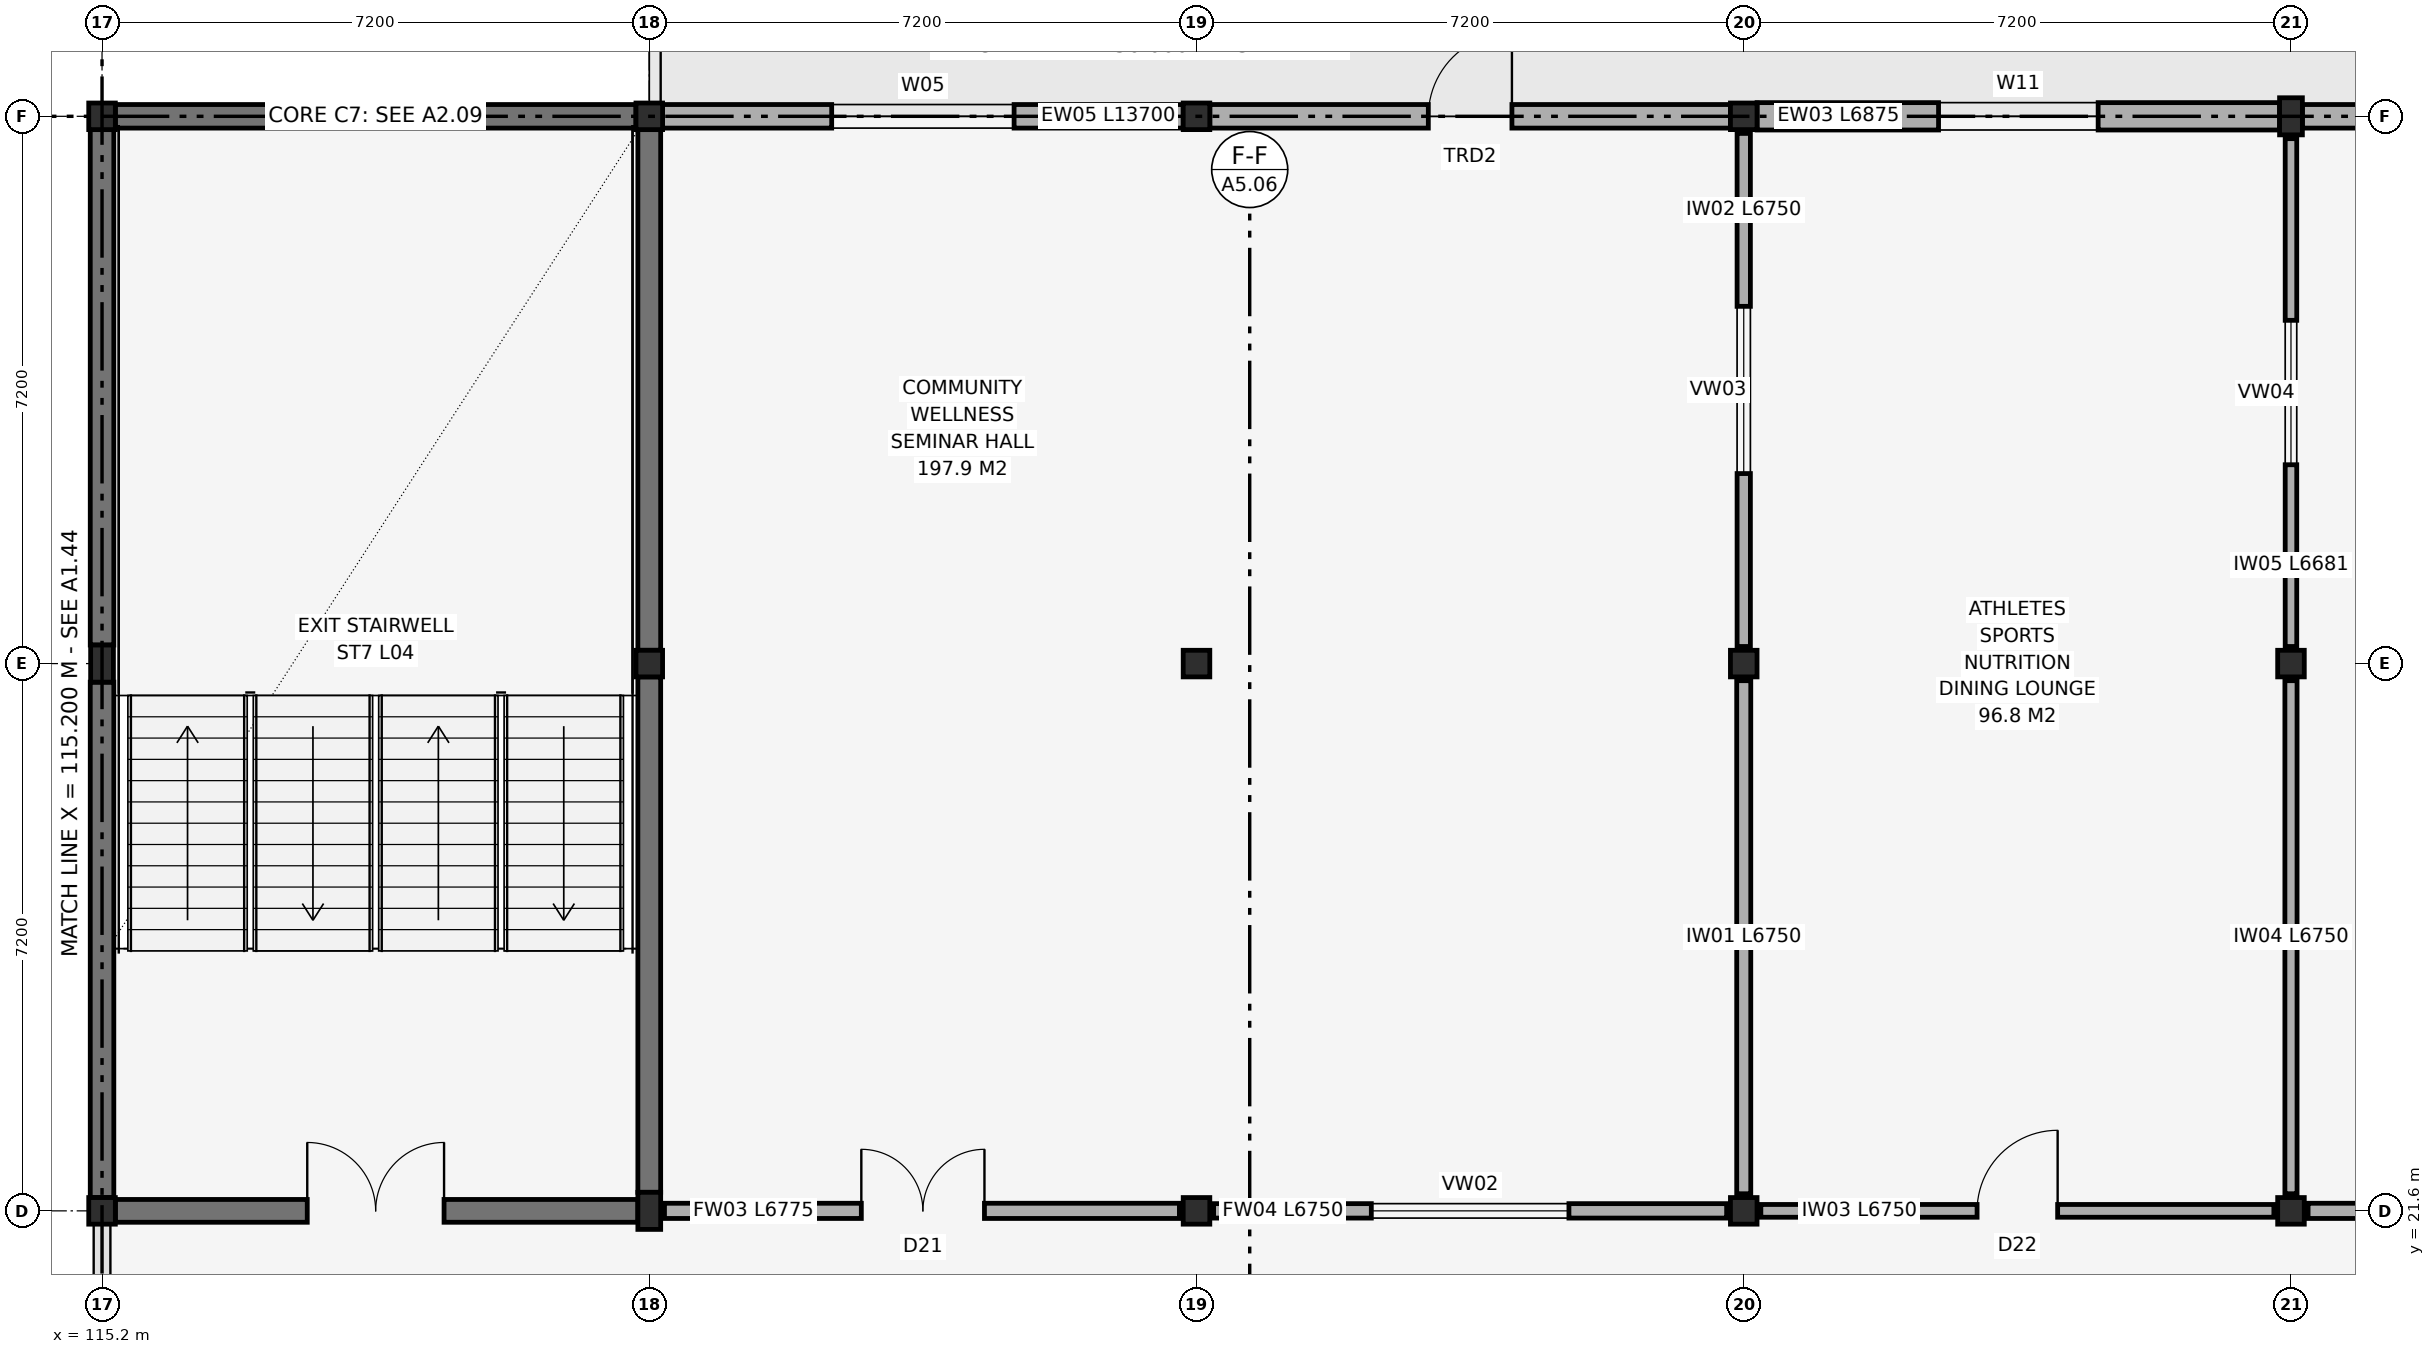
"""IFC4 building model, lengths in metres.
Left out: names, types, materials, properties, quantities, classifications, styles, units other than length and angle.
Written with IfcOpenShell. Run it as: python <this file> out.ifc"""

import sys

from ifc_helpers import new_model, si_unit, direction, frame, frame_2d, origin, origin_2d, place, context, subcontext, project, spatial, rectangle, i_section, extrude, element, fill, save


model = new_model("IFC4")
c1 = context("Model", 3, precision=1e-05, world=origin(), true_north=direction((0.0, 1.0)))
c2 = subcontext(c1, "Body", "Model", "MODEL_VIEW")
j1 = project(units=[si_unit("LENGTHUNIT", "METRE"), si_unit("PLANEANGLEUNIT", "RADIAN")], contexts=[c1])
p1 = place(None, origin())
s1 = spatial("IfcSite", under=j1, at=p1, CompositionType="ELEMENT")
p2 = place(p1, origin())
s2 = spatial("IfcBuilding", under=s1, at=p2, CompositionType="ELEMENT")
p3 = place(p2, frame((0.0, 0.0, 19.2)))
s3 = spatial("IfcBuildingStorey", under=s2, at=p3, CompositionType="ELEMENT", Elevation=19.2)
p4 = place(p3, frame((115.2, 21.6, 0.0), z_axis=(0.0, 0.0, 1.0), x_axis=(1.0, 0.0, 0.0)))
e1 = element("IfcColumn", 1, at=p4, inside=s3, PredefinedType="COLUMN", context=c2, shape_type="SweptSolid", body=[
    extrude(i_section(OverallWidth=0.35, OverallDepth=0.35, WebThickness=0.012, FlangeThickness=0.019, FilletRadius=0.02, at=origin_2d()), origin(), (0.0, 0.0, 1.0), 4.2),
])
p5 = place(p3, frame((115.2, 28.8, 0.0), z_axis=(0.0, 0.0, 1.0), x_axis=(1.0, 0.0, 0.0)))
e2 = element("IfcColumn", 2, at=p5, inside=s3, PredefinedType="COLUMN", context=c2, shape_type="SweptSolid", body=[
    extrude(i_section(OverallWidth=0.3, OverallDepth=0.488, WebThickness=0.011, FlangeThickness=0.018, FilletRadius=0.026, at=origin_2d()), origin(), (0.0, 0.0, 1.0), 4.2),
])
p6 = place(p3, frame((115.2, 36.0, 0.0), z_axis=(0.0, 0.0, 1.0), x_axis=(1.0, 0.0, 0.0)))
e3 = element("IfcColumn", 3, at=p6, inside=s3, PredefinedType="COLUMN", context=c2, shape_type="SweptSolid", body=[
    extrude(i_section(OverallWidth=0.35, OverallDepth=0.35, WebThickness=0.012, FlangeThickness=0.019, FilletRadius=0.02, at=origin_2d()), origin(), (0.0, 0.0, 1.0), 4.2),
])
p7 = place(p3, frame((122.4, 21.6, 0.0), z_axis=(0.0, 0.0, 1.0), x_axis=(1.0, 0.0, 0.0)))
e4 = element("IfcColumn", 4, at=p7, inside=s3, PredefinedType="COLUMN", context=c2, shape_type="SweptSolid", body=[
    extrude(i_section(OverallWidth=0.3, OverallDepth=0.488, WebThickness=0.011, FlangeThickness=0.018, FilletRadius=0.026, at=origin_2d()), origin(), (0.0, 0.0, 1.0), 4.2),
])
for number, where, z_axis, x_axis in (
    (5, (122.4, 28.8, 0.0), (0.0, 0.0, 1.0), (1.0, 0.0, 0.0)),
    (6, (122.4, 36.0, 0.0), (0.0, 0.0, 1.0), (1.0, 0.0, 0.0)),
    (7, (129.6, 21.6, 0.0), (0.0, 0.0, 1.0), (1.0, 0.0, 0.0)),
    (8, (129.6, 28.8, 0.0), (0.0, 0.0, 1.0), (1.0, 0.0, 0.0)),
    (9, (129.6, 36.0, 0.0), (0.0, 0.0, 1.0), (1.0, 0.0, 0.0)),
    (10, (136.8, 21.6, 0.0), (0.0, 0.0, 1.0), (1.0, 0.0, 0.0)),
    (11, (136.8, 28.8, 0.0), (0.0, 0.0, 1.0), (1.0, 0.0, 0.0)),
    (12, (136.8, 36.0, 0.0), (0.0, 0.0, 1.0), (1.0, 0.0, 0.0)),
    (13, (144.0, 21.6, 0.0), (0.0, 0.0, 1.0), (1.0, 0.0, 0.0)),
    (14, (144.0, 28.8, 0.0), (0.0, 0.0, 1.0), (1.0, 0.0, 0.0)),
):
    element("IfcColumn", number, at=place(p3, frame(where, z_axis=z_axis, x_axis=x_axis)), inside=s3, PredefinedType="COLUMN", context=c2, shape_type="SweptSolid", body=[
        extrude(i_section(OverallWidth=0.35, OverallDepth=0.35, WebThickness=0.012, FlangeThickness=0.019, FilletRadius=0.02, at=origin_2d()), origin(), (0.0, 0.0, 1.0), 4.2),
    ])
p8 = place(p3, frame((144.0, 36.0, 0.0), z_axis=(0.0, 0.0, 1.0), x_axis=(1.0, 0.0, 0.0)))
e15 = element("IfcColumn", 15, at=p8, inside=s3, PredefinedType="COLUMN", context=c2, shape_type="SweptSolid", body=[
    extrude(i_section(OverallWidth=0.3, OverallDepth=0.488, WebThickness=0.011, FlangeThickness=0.018, FilletRadius=0.026, at=origin_2d()), origin(), (0.0, 0.0, 1.0), 4.2),
])
p9 = place(p3, frame((122.575, 36.0, 0.0), z_axis=(0.0, 0.0, 1.0), x_axis=(1.0, 0.0, 0.0)))
e16 = element("IfcWall", 16, at=p9, inside=s3, PredefinedType="SOLIDWALL", context=c2, shape_type="SweptSolid", body=[
    extrude(rectangle(XDim=6.85, YDim=0.31, at=frame_2d((3.425, 0.0))), origin(), (0.0, 0.0, 1.0), 3.64),
])
p10 = place(p9, frame((2.225, 0.0, 0.95)))
e17 = element("IfcOpeningElement", 17, at=p10, cuts=e16, PredefinedType="OPENING", context=c2, shape_type="SweptSolid", body=[
    extrude(rectangle(XDim=2.4, YDim=2.0, at=frame_2d((1.2, 1.0))), frame((0.0, 0.17, 0.0), z_axis=(0.0, -1.0, 0.0), x_axis=(1.0, 0.0, 0.0)), (0.0, 0.0, 1.0), 0.34),
])
p11 = place(p3, frame((129.775, 36.0, 0.0), z_axis=(0.0, 0.0, 1.0), x_axis=(1.0, 0.0, 0.0)))
e18 = element("IfcWall", 18, at=p11, inside=s3, PredefinedType="SOLIDWALL", context=c2, shape_type="SweptSolid", body=[
    extrude(rectangle(XDim=6.85, YDim=0.31, at=frame_2d((3.425, 0.0))), origin(), (0.0, 0.0, 1.0), 3.64),
])
p12 = place(p11, frame((2.875, 0.0, 0.0)))
e19 = element("IfcOpeningElement", 19, at=p12, cuts=e18, PredefinedType="OPENING", context=c2, shape_type="SweptSolid", body=[
    extrude(rectangle(XDim=1.1, YDim=2.2, at=frame_2d((0.55, 1.1))), frame((0.0, 0.17, 0.0), z_axis=(0.0, -1.0, 0.0), x_axis=(1.0, 0.0, 0.0)), (0.0, 0.0, 1.0), 0.34),
])
p13 = place(p3, frame((136.975, 36.0, 0.0), z_axis=(0.0, 0.0, 1.0), x_axis=(1.0, 0.0, 0.0)))
e20 = element("IfcWall", 20, at=p13, inside=s3, PredefinedType="SOLIDWALL", context=c2, shape_type="SweptSolid", body=[
    extrude(rectangle(XDim=6.875, YDim=0.36, at=frame_2d((3.438, 0.0))), origin(), (0.0, 0.0, 1.0), 3.64),
])
p14 = place(p13, frame((2.388, 0.0, 0.95)))
e21 = element("IfcOpeningElement", 21, at=p14, cuts=e20, PredefinedType="OPENING", context=c2, shape_type="SweptSolid", body=[
    extrude(rectangle(XDim=2.1, YDim=1.75, at=frame_2d((1.05, 0.875))), frame((0.0, 0.195, 0.0), z_axis=(0.0, -1.0, 0.0), x_axis=(1.0, 0.0, 0.0)), (0.0, 0.0, 1.0), 0.39),
])
p15 = place(p3, frame((144.15, 36.0, 0.0), z_axis=(0.0, 0.0, 1.0), x_axis=(1.0, 0.0, 0.0)))
e22 = element("IfcWall", 22, at=p15, inside=s3, PredefinedType="SOLIDWALL", context=c2, shape_type="SweptSolid", body=[
    extrude(rectangle(XDim=6.875, YDim=0.31, at=frame_2d((3.438, 0.0))), origin(), (0.0, 0.0, 1.0), 3.64),
])
p16 = place(p15, frame((2.837, 0.0, 0.95)))
e23 = element("IfcOpeningElement", 23, at=p16, cuts=e22, PredefinedType="OPENING", context=c2, shape_type="SweptSolid", body=[
    extrude(rectangle(XDim=1.2, YDim=1.75, at=frame_2d((0.6, 0.875))), frame((0.0, 0.17, 0.0), z_axis=(0.0, -1.0, 0.0), x_axis=(1.0, 0.0, 0.0)), (0.0, 0.0, 1.0), 0.34),
])
p17 = place(p3, frame((115.375, 21.6, 0.0), z_axis=(0.0, 0.0, 1.0), x_axis=(1.0, 0.0, 0.0)))
e24 = element("IfcWall", 24, at=p17, inside=s3, PredefinedType="SHEAR", context=c2, shape_type="SweptSolid", body=[
    extrude(rectangle(XDim=6.875, YDim=0.3, at=frame_2d((3.438, 0.0))), origin(), (0.0, 0.0, 1.0), 3.98),
])
p18 = place(p17, frame((2.525, 0.0, 0.0)))
e25 = element("IfcOpeningElement", 25, at=p18, cuts=e24, PredefinedType="OPENING", context=c2, shape_type="SweptSolid", body=[
    extrude(rectangle(XDim=1.8, YDim=2.2, at=frame_2d((0.9, 1.1))), frame((0.0, 0.165, 0.0), z_axis=(0.0, -1.0, 0.0), x_axis=(1.0, 0.0, 0.0)), (0.0, 0.0, 1.0), 0.33),
])
p19 = place(p3, frame((115.375, 36.0, 0.0), z_axis=(0.0, 0.0, 1.0), x_axis=(1.0, 0.0, 0.0)))
e26 = element("IfcWall", 26, at=p19, inside=s3, PredefinedType="SHEAR", context=c2, shape_type="SweptSolid", body=[
    extrude(rectangle(XDim=6.85, YDim=0.31, at=frame_2d((3.425, 0.0))), origin(), (0.0, 0.0, 1.0), 3.98),
])
for number, where, z_axis, x_axis in (
    (27, (115.2, 21.775, 0.0), (0.0, 0.0, 1.0), (0.0, 1.0, 0.0)),
    (28, (115.2, 29.044, 0.0), (0.0, 0.0, 1.0), (0.0, 1.0, 0.0)),
):
    element("IfcWall", number, at=place(p3, frame(where, z_axis=z_axis, x_axis=x_axis)), inside=s3, PredefinedType="SHEAR", context=c2, shape_type="SweptSolid", body=[
        extrude(rectangle(XDim=6.781, YDim=0.31, at=frame_2d((3.391, 0.0))), origin(), (0.0, 0.0, 1.0), 3.98),
    ])
p20 = place(p3, frame((122.4, 21.844, 0.0), z_axis=(0.0, 0.0, 1.0), x_axis=(0.0, 1.0, 0.0)))
e29 = element("IfcWall", 29, at=p20, inside=s3, PredefinedType="SHEAR", context=c2, shape_type="SweptSolid", body=[
    extrude(rectangle(XDim=6.781, YDim=0.3, at=frame_2d((3.391, 0.0))), origin(), (0.0, 0.0, 1.0), 3.98),
])
p21 = place(p3, frame((122.4, 28.975, 0.0), z_axis=(0.0, 0.0, 1.0), x_axis=(0.0, 1.0, 0.0)))
e30 = element("IfcWall", 30, at=p21, inside=s3, PredefinedType="SHEAR", context=c2, shape_type="SweptSolid", body=[
    extrude(rectangle(XDim=6.85, YDim=0.3, at=frame_2d((3.425, 0.0))), origin(), (0.0, 0.0, 1.0), 3.98),
])
p22 = place(p3, frame((122.6, 21.6, 0.0), z_axis=(0.0, 0.0, 1.0), x_axis=(1.0, 0.0, 0.0)))
e31 = element("IfcWall", 31, at=p22, inside=s3, PredefinedType="SOLIDWALL", context=c2, shape_type="SweptSolid", body=[
    extrude(rectangle(XDim=6.775, YDim=0.2, at=frame_2d((3.387, 0.0))), origin(), (0.0, 0.0, 1.0), 3.64),
])
p23 = place(p22, frame((2.59, 0.0, 0.0)))
e32 = element("IfcOpeningElement", 32, at=p23, cuts=e31, PredefinedType="OPENING", context=c2, shape_type="SweptSolid", body=[
    extrude(rectangle(XDim=1.62, YDim=2.2, at=frame_2d((0.81, 1.1))), frame((0.0, 0.115, 0.0), z_axis=(0.0, -1.0, 0.0), x_axis=(1.0, 0.0, 0.0)), (0.0, 0.0, 1.0), 0.23),
])
p24 = place(p3, frame((129.825, 21.6, 0.0), z_axis=(0.0, 0.0, 1.0), x_axis=(1.0, 0.0, 0.0)))
e33 = element("IfcWall", 33, at=p24, inside=s3, PredefinedType="SOLIDWALL", context=c2, shape_type="SweptSolid", body=[
    extrude(rectangle(XDim=6.75, YDim=0.19, at=frame_2d((3.375, 0.0))), origin(), (0.0, 0.0, 1.0), 3.64),
])
p25 = place(p24, frame((2.075, 0.0, 0.95)))
e34 = element("IfcOpeningElement", 34, at=p25, cuts=e33, PredefinedType="OPENING", context=c2, shape_type="SweptSolid", body=[
    extrude(rectangle(XDim=2.6, YDim=1.5, at=frame_2d((1.3, 0.75))), frame((0.0, 0.11, 0.0), z_axis=(0.0, -1.0, 0.0), x_axis=(1.0, 0.0, 0.0)), (0.0, 0.0, 1.0), 0.22),
])
p26 = place(p3, frame((136.8, 21.825, 0.0), z_axis=(0.0, 0.0, 1.0), x_axis=(0.0, 1.0, 0.0)))
e35 = element("IfcWall", 35, at=p26, inside=s3, PredefinedType="PARTITIONING", context=c2, shape_type="SweptSolid", body=[
    extrude(rectangle(XDim=6.75, YDim=0.185, at=frame_2d((3.375, 0.0))), origin(), (0.0, 0.0, 1.0), 3.64),
])
p27 = place(p3, frame((136.8, 29.025, 0.0), z_axis=(0.0, 0.0, 1.0), x_axis=(0.0, 1.0, 0.0)))
e36 = element("IfcWall", 36, at=p27, inside=s3, PredefinedType="PARTITIONING", context=c2, shape_type="SweptSolid", body=[
    extrude(rectangle(XDim=6.75, YDim=0.175, at=frame_2d((3.375, 0.0))), origin(), (0.0, 0.0, 1.0), 3.64),
])
p28 = place(p27, frame((2.275, 0.0, 0.95)))
e37 = element("IfcOpeningElement", 37, at=p28, cuts=e36, PredefinedType="OPENING", context=c2, shape_type="SweptSolid", body=[
    extrude(rectangle(XDim=2.2, YDim=1.5, at=frame_2d((1.1, 0.75))), frame((0.0, 0.103, 0.0), z_axis=(0.0, -1.0, 0.0), x_axis=(1.0, 0.0, 0.0)), (0.0, 0.0, 1.0), 0.205),
])
p29 = place(p3, frame((137.025, 21.6, 0.0), z_axis=(0.0, 0.0, 1.0), x_axis=(1.0, 0.0, 0.0)))
e38 = element("IfcWall", 38, at=p29, inside=s3, PredefinedType="PARTITIONING", context=c2, shape_type="SweptSolid", body=[
    extrude(rectangle(XDim=6.75, YDim=0.168, at=frame_2d((3.375, 0.0))), origin(), (0.0, 0.0, 1.0), 3.64),
])
p30 = place(p29, frame((2.845, 0.0, 0.0)))
e39 = element("IfcOpeningElement", 39, at=p30, cuts=e38, PredefinedType="OPENING", context=c2, shape_type="SweptSolid", body=[
    extrude(rectangle(XDim=1.06, YDim=2.15, at=frame_2d((0.53, 1.075))), frame((0.0, 0.099, 0.0), z_axis=(0.0, -1.0, 0.0), x_axis=(1.0, 0.0, 0.0)), (0.0, 0.0, 1.0), 0.198),
])
p31 = place(p3, frame((144.0, 21.825, 0.0), z_axis=(0.0, 0.0, 1.0), x_axis=(0.0, 1.0, 0.0)))
e40 = element("IfcWall", 40, at=p31, inside=s3, PredefinedType="PARTITIONING", context=c2, shape_type="SweptSolid", body=[
    extrude(rectangle(XDim=6.75, YDim=0.16, at=frame_2d((3.375, 0.0))), origin(), (0.0, 0.0, 1.0), 3.64),
])
p32 = place(p3, frame((144.0, 29.025, 0.0), z_axis=(0.0, 0.0, 1.0), x_axis=(0.0, 1.0, 0.0)))
e41 = element("IfcWall", 41, at=p32, inside=s3, PredefinedType="PARTITIONING", context=c2, shape_type="SweptSolid", body=[
    extrude(rectangle(XDim=6.681, YDim=0.152, at=frame_2d((3.341, 0.0))), origin(), (0.0, 0.0, 1.0), 3.64),
])
p33 = place(p32, frame((2.391, 0.0, 0.95)))
e42 = element("IfcOpeningElement", 42, at=p33, cuts=e41, PredefinedType="OPENING", context=c2, shape_type="SweptSolid", body=[
    extrude(rectangle(XDim=1.9, YDim=1.5, at=frame_2d((0.95, 0.75))), frame((0.0, 0.091, 0.0), z_axis=(0.0, -1.0, 0.0), x_axis=(1.0, 0.0, 0.0)), (0.0, 0.0, 1.0), 0.182),
])
p34 = place(p3, frame((144.225, 21.6, 0.0), z_axis=(0.0, 0.0, 1.0), x_axis=(1.0, 0.0, 0.0)))
e43 = element("IfcWall", 43, at=p34, inside=s3, PredefinedType="SOLIDWALL", context=c2, shape_type="SweptSolid", body=[
    extrude(rectangle(XDim=6.75, YDim=0.2, at=frame_2d((3.375, 0.0))), origin(), (0.0, 0.0, 1.0), 3.64),
])
p35 = place(p34, frame((2.9, 0.0, 0.0)))
e44 = element("IfcOpeningElement", 44, at=p35, cuts=e43, PredefinedType="OPENING", context=c2, shape_type="SweptSolid", body=[
    extrude(rectangle(XDim=0.95, YDim=2.1, at=frame_2d((0.475, 1.05))), frame((0.0, 0.115, 0.0), z_axis=(0.0, -1.0, 0.0), x_axis=(1.0, 0.0, 0.0)), (0.0, 0.0, 1.0), 0.23),
])
p36 = place(p10, origin())
e45 = element("IfcWindow", 45, at=p36, inside=s3, PartitioningType="SINGLE_PANEL", PredefinedType="WINDOW", context=c2, shape_type="SweptSolid", body=[
    extrude(rectangle(XDim=2.4, YDim=2.0, at=frame_2d((1.2, 1.0))), frame((0.0, 0.03, 0.0), z_axis=(0.0, -1.0, 0.0), x_axis=(1.0, 0.0, 0.0)), (0.0, 0.0, 1.0), 0.06),
])
fill(e17, e45)
p37 = place(p12, origin())
e46 = element("IfcDoor", 46, at=p37, inside=s3, OperationType="SINGLE_SWING_RIGHT", PredefinedType="DOOR", context=c2, shape_type="SweptSolid", body=[
    extrude(rectangle(XDim=1.1, YDim=2.2, at=frame_2d((0.55, 1.1))), frame((0.0, 0.025, 0.0), z_axis=(0.0, -1.0, 0.0), x_axis=(1.0, 0.0, 0.0)), (0.0, 0.0, 1.0), 0.05),
])
fill(e19, e46)
p38 = place(p14, origin())
e47 = element("IfcWindow", 47, at=p38, inside=s3, PartitioningType="SINGLE_PANEL", PredefinedType="WINDOW", context=c2, shape_type="SweptSolid", body=[
    extrude(rectangle(XDim=2.1, YDim=1.75, at=frame_2d((1.05, 0.875))), frame((0.0, 0.03, 0.0), z_axis=(0.0, -1.0, 0.0), x_axis=(1.0, 0.0, 0.0)), (0.0, 0.0, 1.0), 0.06),
])
fill(e21, e47)
p39 = place(p18, origin())
e48 = element("IfcDoor", 48, at=p39, inside=s3, OperationType="DOUBLE_SWING_LEFT", PredefinedType="DOOR", context=c2, shape_type="SweptSolid", body=[
    extrude(rectangle(XDim=1.8, YDim=2.2, at=frame_2d((0.9, 1.1))), frame((0.0, 0.025, 0.0), z_axis=(0.0, -1.0, 0.0), x_axis=(1.0, 0.0, 0.0)), (0.0, 0.0, 1.0), 0.05),
])
fill(e25, e48)
p40 = place(p23, origin())
e49 = element("IfcDoor", 49, at=p40, inside=s3, OperationType="DOUBLE_SWING_LEFT", PredefinedType="DOOR", context=c2, shape_type="SweptSolid", body=[
    extrude(rectangle(XDim=1.62, YDim=2.2, at=frame_2d((0.81, 1.1))), frame((0.0, 0.025, 0.0), z_axis=(0.0, -1.0, 0.0), x_axis=(1.0, 0.0, 0.0)), (0.0, 0.0, 1.0), 0.05),
])
fill(e32, e49)
p41 = place(p25, origin())
e50 = element("IfcWindow", 50, at=p41, inside=s3, PartitioningType="SINGLE_PANEL", PredefinedType="WINDOW", context=c2, shape_type="SweptSolid", body=[
    extrude(rectangle(XDim=2.6, YDim=1.5, at=frame_2d((1.3, 0.75))), frame((0.0, 0.03, 0.0), z_axis=(0.0, -1.0, 0.0), x_axis=(1.0, 0.0, 0.0)), (0.0, 0.0, 1.0), 0.06),
])
fill(e34, e50)
p42 = place(p28, origin())
e51 = element("IfcWindow", 51, at=p42, inside=s3, PartitioningType="SINGLE_PANEL", PredefinedType="WINDOW", context=c2, shape_type="SweptSolid", body=[
    extrude(rectangle(XDim=2.2, YDim=1.5, at=frame_2d((1.1, 0.75))), frame((0.0, 0.03, 0.0), z_axis=(0.0, -1.0, 0.0), x_axis=(1.0, 0.0, 0.0)), (0.0, 0.0, 1.0), 0.06),
])
fill(e37, e51)
p43 = place(p30, origin())
e52 = element("IfcDoor", 52, at=p43, inside=s3, OperationType="SINGLE_SWING_RIGHT", PredefinedType="DOOR", context=c2, shape_type="SweptSolid", body=[
    extrude(rectangle(XDim=1.06, YDim=2.15, at=frame_2d((0.53, 1.075))), frame((0.0, 0.025, 0.0), z_axis=(0.0, -1.0, 0.0), x_axis=(1.0, 0.0, 0.0)), (0.0, 0.0, 1.0), 0.05),
])
fill(e39, e52)
p44 = place(p33, origin())
e53 = element("IfcWindow", 53, at=p44, inside=s3, PartitioningType="SINGLE_PANEL", PredefinedType="WINDOW", context=c2, shape_type="SweptSolid", body=[
    extrude(rectangle(XDim=1.9, YDim=1.5, at=frame_2d((0.95, 0.75))), frame((0.0, 0.03, 0.0), z_axis=(0.0, -1.0, 0.0), x_axis=(1.0, 0.0, 0.0)), (0.0, 0.0, 1.0), 0.06),
])
fill(e42, e53)
save(model, sys.argv[1])
